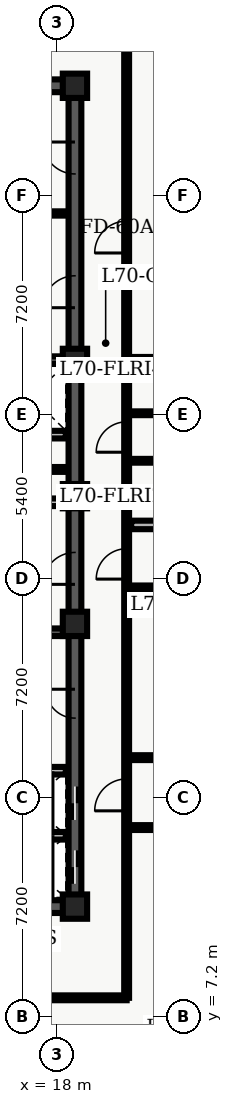
"""IFC4 building model, lengths in metres.
Left out: names, types, materials, properties, quantities, classifications, styles, units other than length and angle.
Written with IfcOpenShell. Run it as: python <this file> out.ifc"""

import sys

from ifc_helpers import new_model, entity, si_unit, converted_unit, direction, frame, origin_with_axes, origin_2d_with_axis, place, context, subcontext, project, spatial, polyline, rectangle, outline, extrude, element, fill, save


model = new_model("IFC4")
c1 = context("Model", 3, precision=1e-05, world=origin_with_axes(), true_north=direction((0.0, 1.0)))
c2 = subcontext(c1, "Body", "Model", "MODEL_VIEW")
j1 = project(units=[si_unit("LENGTHUNIT", "METRE"), converted_unit("PLANEANGLEUNIT", "DEGREE", entity("IfcPlaneAngleMeasure", 0.017), si_unit("PLANEANGLEUNIT", "RADIAN"), dimensions=[0, 0, 0, 0, 0, 0, 0])], contexts=[c1])
p1 = place(None, origin_with_axes())
s1 = spatial("IfcSite", under=j1, at=p1, CompositionType="ELEMENT")
p2 = place(p1, origin_with_axes())
s2 = spatial("IfcBuilding", under=s1, at=p2, CompositionType="ELEMENT")
p3 = place(p2, frame((0.0, 0.0, 284.1), z_axis=(0.0, 0.0, 1.0), x_axis=(1.0, 0.0, 0.0)))
s3 = spatial("IfcBuildingStorey", under=s2, at=p3, CompositionType="ELEMENT", Elevation=284.1)
p4 = place(p3, frame((11.4, 10.8, 0.0), z_axis=(0.0, 0.0, 1.0), x_axis=(1.0, 0.0, 0.0)))
e1 = element("IfcWall", 1, at=p4, inside=s3, PredefinedType="SHEAR", context=c2, shape_type="SweptSolid", body=[
    extrude(outline(polyline([(0.0, -0.21), (7.2, -0.21), (7.2, 0.21), (0.0, 0.21), (0.0, -0.21)])), origin_with_axes(), (0.0, 0.0, 1.0), 3.6),
])
p5 = place(p4, frame((2.625, 0.0, 0.0), z_axis=(0.0, 0.0, 1.0), x_axis=(1.0, 0.0, 0.0)))
e2 = element("IfcOpeningElement", 2, at=p5, cuts=e1, PredefinedType="OPENING", context=c2, shape_type="SweptSolid", body=[
    extrude(rectangle(XDim=1.05, YDim=0.44, at=origin_2d_with_axis()), origin_with_axes(), (0.0, 0.0, 1.0), 2.15),
])
p6 = place(p3, frame((11.4, 37.8, 0.0), z_axis=(0.0, 0.0, 1.0), x_axis=(1.0, 0.0, 0.0)))
e3 = element("IfcWall", 3, at=p6, inside=s3, PredefinedType="SHEAR", context=c2, shape_type="SweptSolid", body=[
    extrude(outline(polyline([(0.0, -0.21), (7.2, -0.21), (7.2, 0.21), (0.0, 0.21), (0.0, -0.21)])), origin_with_axes(), (0.0, 0.0, 1.0), 3.6),
])
p7 = place(p6, frame((2.625, 0.0, 0.0), z_axis=(0.0, 0.0, 1.0), x_axis=(1.0, 0.0, 0.0)))
e4 = element("IfcOpeningElement", 4, at=p7, cuts=e3, PredefinedType="OPENING", context=c2, shape_type="SweptSolid", body=[
    extrude(rectangle(XDim=1.05, YDim=0.44, at=origin_2d_with_axis()), origin_with_axes(), (0.0, 0.0, 1.0), 2.15),
])
p8 = place(p3, frame((18.6, 10.8, 0.0), z_axis=(0.0, 0.0, 1.0), x_axis=(0.0, 1.0, 0.0)))
e5 = element("IfcWall", 5, at=p8, inside=s3, PredefinedType="SHEAR", context=c2, shape_type="SweptSolid", body=[
    extrude(outline(polyline([(0.0, -0.21), (13.5, -0.21), (13.5, 0.21), (0.0, 0.21), (0.0, -0.21)])), origin_with_axes(), (0.0, 0.0, 1.0), 3.6),
])
p9 = place(p8, frame((1.3, 0.0, 0.0), z_axis=(0.0, 0.0, 1.0), x_axis=(1.0, 0.0, 0.0)))
e6 = element("IfcOpeningElement", 6, at=p9, cuts=e5, PredefinedType="OPENING", context=c2, shape_type="SweptSolid", body=[
    extrude(rectangle(XDim=1.1, YDim=0.44, at=origin_2d_with_axis()), origin_with_axes(), (0.0, 0.0, 1.0), 2.15),
])
p10 = place(p8, frame((3.4, 0.0, 0.0), z_axis=(0.0, 0.0, 1.0), x_axis=(1.0, 0.0, 0.0)))
e7 = element("IfcOpeningElement", 7, at=p10, cuts=e5, PredefinedType="OPENING", context=c2, shape_type="SweptSolid", body=[
    extrude(rectangle(XDim=1.1, YDim=0.44, at=origin_2d_with_axis()), origin_with_axes(), (0.0, 0.0, 1.0), 2.15),
])
p11 = place(p8, frame((11.125, 0.0, 0.0), z_axis=(0.0, 0.0, 1.0), x_axis=(1.0, 0.0, 0.0)))
e8 = element("IfcOpeningElement", 8, at=p11, cuts=e5, PredefinedType="OPENING", context=c2, shape_type="SweptSolid", body=[
    extrude(rectangle(XDim=1.05, YDim=0.44, at=origin_2d_with_axis()), origin_with_axes(), (0.0, 0.0, 1.0), 2.15),
])
p12 = place(p8, frame((6.675, 0.0, 0.0), z_axis=(0.0, 0.0, 1.0), x_axis=(1.0, 0.0, 0.0)))
e9 = element("IfcOpeningElement", 9, at=p12, cuts=e5, PredefinedType="OPENING", context=c2, shape_type="SweptSolid", body=[
    extrude(rectangle(XDim=0.95, YDim=0.44, at=origin_2d_with_axis()), origin_with_axes(), (0.0, 0.0, 1.0), 2.15),
])
p13 = place(p3, frame((18.6, 24.3, 0.0), z_axis=(0.0, 0.0, 1.0), x_axis=(0.0, 1.0, 0.0)))
e10 = element("IfcWall", 10, at=p13, inside=s3, PredefinedType="SHEAR", context=c2, shape_type="SweptSolid", body=[
    extrude(outline(polyline([(0.0, -0.21), (13.5, -0.21), (13.5, 0.21), (0.0, 0.21), (0.0, -0.21)])), origin_with_axes(), (0.0, 0.0, 1.0), 3.6),
])
p14 = place(p13, frame((6.725, 0.0, 0.0), z_axis=(0.0, 0.0, 1.0), x_axis=(1.0, 0.0, 0.0)))
e11 = element("IfcOpeningElement", 11, at=p14, cuts=e10, PredefinedType="OPENING", context=c2, shape_type="SweptSolid", body=[
    extrude(rectangle(XDim=1.05, YDim=0.44, at=origin_2d_with_axis()), origin_with_axes(), (0.0, 0.0, 1.0), 2.15),
])
p15 = place(p13, frame((11.125, 0.0, 0.0), z_axis=(0.0, 0.0, 1.0), x_axis=(1.0, 0.0, 0.0)))
e12 = element("IfcOpeningElement", 12, at=p15, cuts=e10, PredefinedType="OPENING", context=c2, shape_type="SweptSolid", body=[
    extrude(rectangle(XDim=1.05, YDim=0.44, at=origin_2d_with_axis()), origin_with_axes(), (0.0, 0.0, 1.0), 2.15),
])
for number, where, z_axis, x_axis in (
    (13, (11.61, 19.825, 0.0), (0.0, 0.0, 1.0), (1.0, 0.0, 0.0)),
    (14, (11.61, 28.775, 0.0), (0.0, 0.0, 1.0), (1.0, 0.0, 0.0)),
):
    element("IfcWall", number, at=place(p3, frame(where, z_axis=z_axis, x_axis=x_axis)), inside=s3, PredefinedType="SHEAR", context=c2, shape_type="SweptSolid", body=[
        extrude(outline(polyline([(0.0, -0.125), (6.78, -0.125), (6.78, 0.125), (0.0, 0.125), (0.0, -0.125)])), origin_with_axes(), (0.0, 0.0, 1.0), 3.6),
    ])
p16 = place(p3, frame((11.7, 24.1, 0.0), z_axis=(0.0, 0.0, 1.0), x_axis=(1.0, 0.0, 0.0)))
e15 = element("IfcWall", 15, at=p16, inside=s3, PredefinedType="SOLIDWALL", context=c2, shape_type="SweptSolid", body=[
    extrude(outline(polyline([(0.0, -0.125), (6.6, -0.125), (6.6, 0.125), (0.0, 0.125), (0.0, -0.125)])), origin_with_axes(), (0.0, 0.0, 1.0), 2.64),
])
p17 = place(p16, frame((3.75, 0.0, 0.0), z_axis=(0.0, 0.0, 1.0), x_axis=(1.0, 0.0, 0.0)))
e16 = element("IfcOpeningElement", 16, at=p17, cuts=e15, PredefinedType="OPENING", context=c2, shape_type="SweptSolid", body=[
    extrude(rectangle(XDim=0.9, YDim=0.27, at=origin_2d_with_axis()), origin_with_axes(), (0.0, 0.0, 1.0), 2.15),
])
p18 = place(p3, frame((11.7, 26.325, 0.0), z_axis=(0.0, 0.0, 1.0), x_axis=(1.0, 0.0, 0.0)))
e17 = element("IfcWall", 17, at=p18, inside=s3, PredefinedType="SOLIDWALL", context=c2, shape_type="SweptSolid", body=[
    extrude(outline(polyline([(0.0, -0.125), (6.6, -0.125), (6.6, 0.125), (0.0, 0.125), (0.0, -0.125)])), origin_with_axes(), (0.0, 0.0, 1.0), 2.64),
])
p19 = place(p18, frame((3.5, 0.0, 0.0), z_axis=(0.0, 0.0, 1.0), x_axis=(1.0, 0.0, 0.0)))
e18 = element("IfcOpeningElement", 18, at=p19, cuts=e17, PredefinedType="OPENING", context=c2, shape_type="SweptSolid", body=[
    extrude(rectangle(XDim=0.9, YDim=0.27, at=origin_2d_with_axis()), origin_with_axes(), (0.0, 0.0, 1.0), 2.15),
])
for number, where, z_axis, x_axis in (
    (19, (18.6, 10.8, 0.0), (0.0, 0.0, 1.0), (1.0, 0.0, 0.0)),
    (20, (18.6, 20.1, 0.0), (0.0, 0.0, 1.0), (1.0, 0.0, 0.0)),
    (21, (18.6, 24.3, 0.0), (0.0, 0.0, 1.0), (1.0, 0.0, 0.0)),
    (22, (18.6, 28.75, 0.0), (0.0, 0.0, 1.0), (1.0, 0.0, 0.0)),
    (23, (18.6, 37.8, 0.0), (0.0, 0.0, 1.0), (1.0, 0.0, 0.0)),
):
    element("IfcColumn", number, at=place(p3, frame(where, z_axis=z_axis, x_axis=x_axis)), inside=s3, PredefinedType="COLUMN", context=c2, shape_type="SweptSolid", body=[
        extrude(rectangle(XDim=0.8, YDim=0.8, at=origin_2d_with_axis()), origin_with_axes(), (0.0, 0.0, 1.0), 3.9),
    ])
p20 = place(p3, frame((14.62, 25.18, 0.0), z_axis=(0.0, 0.0, 1.0), x_axis=(1.0, 0.0, 0.0)))
e24 = element("IfcWall", 24, at=p20, inside=s3, PredefinedType="PARTITIONING", context=c2, shape_type="SweptSolid", body=[
    extrude(outline(polyline([(0.0, -0.08), (3.68, -0.08), (3.68, 0.08), (0.0, 0.08), (0.0, -0.08)])), origin_with_axes(), (0.0, 0.0, 1.0), 2.64),
])
p21 = place(p20, frame((1.95, 0.0, 0.0), z_axis=(0.0, 0.0, 1.0), x_axis=(1.0, 0.0, 0.0)))
e25 = element("IfcOpeningElement", 25, at=p21, cuts=e24, PredefinedType="OPENING", context=c2, shape_type="SweptSolid", body=[
    extrude(rectangle(XDim=0.9, YDim=0.18, at=origin_2d_with_axis()), origin_with_axes(), (0.0, 0.0, 1.0), 2.15),
])
for number, where, z_axis, x_axis in (
    (26, (15.84, 13.13, 0.0), (0.0, 0.0, 1.0), (1.0, 0.0, 0.0)),
    (27, (15.84, 15.27, 0.0), (0.0, 0.0, 1.0), (1.0, 0.0, 0.0)),
):
    element("IfcWall", number, at=place(p3, frame(where, z_axis=z_axis, x_axis=x_axis)), inside=s3, PredefinedType="SOLIDWALL", context=c2, shape_type="SweptSolid", body=[
        extrude(outline(polyline([(0.0, -0.125), (2.46, -0.125), (2.46, 0.125), (0.0, 0.125), (0.0, -0.125)])), origin_with_axes(), (0.0, 0.0, 1.0), 2.64),
    ])
p22 = place(p3, frame((15.84, 33.6, 0.0), z_axis=(0.0, 0.0, 1.0), x_axis=(1.0, 0.0, 0.0)))
e28 = element("IfcWall", 28, at=p22, inside=s3, PredefinedType="PARTITIONING", context=c2, shape_type="SweptSolid", body=[
    extrude(outline(polyline([(0.0, -0.07), (2.46, -0.07), (2.46, 0.07), (0.0, 0.07), (0.0, -0.07)])), origin_with_axes(), (0.0, 0.0, 1.0), 2.64),
])
p23 = place(p3, frame((8.135, 7.8, 0.0), z_axis=(0.0, 0.0, 1.0), x_axis=(1.0, 0.0, 0.0)))
e29 = element("IfcWall", 29, at=p23, inside=s3, PredefinedType="PARTITIONING", context=c2, shape_type="SweptSolid", body=[
    extrude(outline(polyline([(0.0, -0.08), (12.165, -0.08), (12.165, 0.08), (0.0, 0.08), (0.0, -0.08)])), origin_with_axes(), (0.0, 0.0, 1.0), 2.64),
])
p24 = place(p23, frame((6.065, 0.0, 0.0), z_axis=(0.0, 0.0, 1.0), x_axis=(1.0, 0.0, 0.0)))
e30 = element("IfcOpeningElement", 30, at=p24, cuts=e29, PredefinedType="OPENING", context=c2, shape_type="SweptSolid", body=[
    extrude(rectangle(XDim=1.0, YDim=0.18, at=origin_2d_with_axis()), origin_with_axes(), (0.0, 0.0, 1.0), 2.15),
])
p25 = place(p3, frame((20.3, 7.8, 0.0), z_axis=(0.0, 0.0, 1.0), x_axis=(0.0, 1.0, 0.0)))
e31 = element("IfcWall", 31, at=p25, inside=s3, PredefinedType="PARTITIONING", context=c2, shape_type="SweptSolid", body=[
    extrude(outline(polyline([(0.0, -0.08), (32.7, -0.08), (32.7, 0.08), (0.0, 0.08), (0.0, -0.08)])), origin_with_axes(), (0.0, 0.0, 1.0), 2.64),
])
p26 = place(p25, frame((25.025, 0.0, 0.0), z_axis=(0.0, 0.0, 1.0), x_axis=(1.0, 0.0, 0.0)))
e32 = element("IfcOpeningElement", 32, at=p26, cuts=e31, PredefinedType="OPENING", context=c2, shape_type="SweptSolid", body=[
    extrude(rectangle(XDim=1.05, YDim=0.18, at=origin_2d_with_axis()), origin_with_axes(), (0.0, 0.0, 1.0), 2.15),
])
p27 = place(p25, frame((14.273, 0.0, 0.0), z_axis=(0.0, 0.0, 1.0), x_axis=(1.0, 0.0, 0.0)))
e33 = element("IfcOpeningElement", 33, at=p27, cuts=e31, PredefinedType="OPENING", context=c2, shape_type="SweptSolid", body=[
    extrude(rectangle(XDim=1.0, YDim=0.18, at=origin_2d_with_axis()), origin_with_axes(), (0.0, 0.0, 1.0), 2.15),
])
p28 = place(p25, frame((18.447, 0.0, 0.0), z_axis=(0.0, 0.0, 1.0), x_axis=(1.0, 0.0, 0.0)))
e34 = element("IfcOpeningElement", 34, at=p28, cuts=e31, PredefinedType="OPENING", context=c2, shape_type="SweptSolid", body=[
    extrude(rectangle(XDim=1.0, YDim=0.18, at=origin_2d_with_axis()), origin_with_axes(), (0.0, 0.0, 1.0), 2.15),
])
p29 = place(p25, frame((6.675, 0.0, 0.0), z_axis=(0.0, 0.0, 1.0), x_axis=(1.0, 0.0, 0.0)))
e35 = element("IfcOpeningElement", 35, at=p29, cuts=e31, PredefinedType="OPENING", context=c2, shape_type="SweptSolid", body=[
    extrude(rectangle(XDim=1.05, YDim=0.18, at=origin_2d_with_axis()), origin_with_axes(), (0.0, 0.0, 1.0), 2.15),
])
p30 = place(p3, frame((20.3, 28.8, 0.0), z_axis=(0.0, 0.0, 1.0), x_axis=(1.0, 0.0, 0.0)))
e36 = element("IfcWall", 36, at=p30, inside=s3, PredefinedType="PARTITIONING", context=c2, shape_type="SweptSolid", body=[
    extrude(outline(polyline([(0.0, -0.08), (3.32, -0.08), (3.32, 0.08), (0.0, 0.08), (0.0, -0.08)])), origin_with_axes(), (0.0, 0.0, 1.0), 2.64),
])
p31 = place(p3, frame((20.45, 23.355, 0.0), z_axis=(0.0, 0.0, 1.0), x_axis=(1.0, 0.0, 0.0)))
e37 = element("IfcWall", 37, at=p31, inside=s3, PredefinedType="PARTITIONING", context=c2, shape_type="SweptSolid", body=[
    extrude(outline(polyline([(0.0, -0.14), (14.085, -0.14), (14.085, 0.14), (0.0, 0.14), (0.0, -0.14)])), origin_with_axes(), (0.0, 0.0, 1.0), 2.64),
])
p32 = place(p31, frame((2.975, 0.0, 0.0), z_axis=(0.0, 0.0, 1.0), x_axis=(1.0, 0.0, 0.0)))
e38 = element("IfcOpeningElement", 38, at=p32, cuts=e37, PredefinedType="OPENING", context=c2, shape_type="SweptSolid", body=[
    extrude(rectangle(XDim=0.95, YDim=0.3, at=origin_2d_with_axis()), origin_with_axes(), (0.0, 0.0, 1.0), 2.15),
])
p33 = place(p3, frame((20.45, 25.465, 0.0), z_axis=(0.0, 0.0, 1.0), x_axis=(1.0, 0.0, 0.0)))
e39 = element("IfcWall", 39, at=p33, inside=s3, PredefinedType="PARTITIONING", context=c2, shape_type="SweptSolid", body=[
    extrude(outline(polyline([(0.0, -0.062), (14.085, -0.062), (14.085, 0.062), (0.0, 0.062), (0.0, -0.062)])), origin_with_axes(), (0.0, 0.0, 1.0), 2.64),
])
p34 = place(p3, frame((20.45, 27.028, 0.0), z_axis=(0.0, 0.0, 1.0), x_axis=(1.0, 0.0, 0.0)))
e40 = element("IfcWall", 40, at=p34, inside=s3, PredefinedType="PARTITIONING", context=c2, shape_type="SweptSolid", body=[
    extrude(outline(polyline([(0.0, -0.062), (14.085, -0.062), (14.085, 0.062), (0.0, 0.062), (0.0, -0.062)])), origin_with_axes(), (0.0, 0.0, 1.0), 2.64),
])
p35 = place(p34, frame((2.975, 0.0, 0.0), z_axis=(0.0, 0.0, 1.0), x_axis=(1.0, 0.0, 0.0)))
e41 = element("IfcOpeningElement", 41, at=p35, cuts=e40, PredefinedType="OPENING", context=c2, shape_type="SweptSolid", body=[
    extrude(rectangle(XDim=0.95, YDim=0.145, at=origin_2d_with_axis()), origin_with_axes(), (0.0, 0.0, 1.0), 2.15),
])
p36 = place(p3, frame((20.3, 13.4, 0.0), z_axis=(0.0, 0.0, 1.0), x_axis=(1.0, 0.0, 0.0)))
e42 = element("IfcWall", 42, at=p36, inside=s3, PredefinedType="PARTITIONING", context=c2, shape_type="SweptSolid", body=[
    extrude(outline(polyline([(0.0, -0.08), (15.45, -0.08), (15.45, 0.08), (0.0, 0.08), (0.0, -0.08)])), origin_with_axes(), (0.0, 0.0, 1.0), 2.64),
])
p37 = place(p36, frame((2.304, 0.0, 0.0), z_axis=(0.0, 0.0, 1.0), x_axis=(1.0, 0.0, 0.0)))
e43 = element("IfcOpeningElement", 43, at=p37, cuts=e42, PredefinedType="OPENING", context=c2, shape_type="SweptSolid", body=[
    extrude(rectangle(XDim=1.0, YDim=0.18, at=origin_2d_with_axis()), origin_with_axes(), (0.0, 0.0, 1.0), 2.15),
])
p38 = place(p36, frame((6.866, 0.0, 0.0), z_axis=(0.0, 0.0, 1.0), x_axis=(1.0, 0.0, 0.0)))
e44 = element("IfcOpeningElement", 44, at=p38, cuts=e42, PredefinedType="OPENING", context=c2, shape_type="SweptSolid", body=[
    extrude(rectangle(XDim=1.0, YDim=0.18, at=origin_2d_with_axis()), origin_with_axes(), (0.0, 0.0, 1.0), 2.15),
])
p39 = place(p36, frame((12.337, 0.0, 0.0), z_axis=(0.0, 0.0, 1.0), x_axis=(1.0, 0.0, 0.0)))
e45 = element("IfcOpeningElement", 45, at=p39, cuts=e42, PredefinedType="OPENING", context=c2, shape_type="SweptSolid", body=[
    extrude(rectangle(XDim=1.2, YDim=0.18, at=origin_2d_with_axis()), origin_with_axes(), (0.0, 0.0, 1.0), 2.2),
])
p40 = place(p3, frame((20.3, 15.7, 0.0), z_axis=(0.0, 0.0, 1.0), x_axis=(1.0, 0.0, 0.0)))
e46 = element("IfcWall", 46, at=p40, inside=s3, PredefinedType="PARTITIONING", context=c2, shape_type="SweptSolid", body=[
    extrude(outline(polyline([(0.0, -0.08), (15.45, -0.08), (15.45, 0.08), (0.0, 0.08), (0.0, -0.08)])), origin_with_axes(), (0.0, 0.0, 1.0), 2.64),
])
p41 = place(p40, frame((7.775, 0.0, 0.0), z_axis=(0.0, 0.0, 1.0), x_axis=(1.0, 0.0, 0.0)))
e47 = element("IfcOpeningElement", 47, at=p41, cuts=e46, PredefinedType="OPENING", context=c2, shape_type="SweptSolid", body=[
    extrude(rectangle(XDim=1.0, YDim=0.18, at=origin_2d_with_axis()), origin_with_axes(), (0.0, 0.0, 1.0), 2.15),
])
p42 = place(p3, frame((20.3, 21.3, 0.0), z_axis=(0.0, 0.0, 1.0), x_axis=(1.0, 0.0, 0.0)))
e48 = element("IfcWall", 48, at=p42, inside=s3, PredefinedType="PARTITIONING", context=c2, shape_type="SweptSolid", body=[
    extrude(outline(polyline([(0.0, -0.062), (11.765, -0.062), (11.765, 0.062), (0.0, 0.062), (0.0, -0.062)])), origin_with_axes(), (0.0, 0.0, 1.0), 2.64),
])
p43 = place(p8, frame((1.3, 0.0, 0.0), z_axis=(0.0, 0.0, 1.0), x_axis=(1.0, 0.0, 0.0)))
e49 = element("IfcDoor", 49, at=p43, inside=s3, OperationType="SLIDING_TO_LEFT", PredefinedType="DOOR", context=c2, shape_type="SweptSolid", body=[
    extrude(rectangle(XDim=1.1, YDim=0.09, at=origin_2d_with_axis()), origin_with_axes(), (0.0, 0.0, 1.0), 2.15),
])
fill(e6, e49)
p44 = place(p8, frame((3.4, 0.0, 0.0), z_axis=(0.0, 0.0, 1.0), x_axis=(1.0, 0.0, 0.0)))
e50 = element("IfcDoor", 50, at=p44, inside=s3, OperationType="SLIDING_TO_RIGHT", PredefinedType="DOOR", context=c2, shape_type="SweptSolid", body=[
    extrude(rectangle(XDim=1.1, YDim=0.09, at=origin_2d_with_axis()), origin_with_axes(), (0.0, 0.0, 1.0), 2.15),
])
fill(e7, e50)
p45 = place(p8, frame((11.125, 0.0, 0.0), z_axis=(0.0, 0.0, 1.0), x_axis=(1.0, 0.0, 0.0)))
e51 = element("IfcDoor", 51, at=p45, inside=s3, OperationType="SINGLE_SWING_LEFT", PredefinedType="DOOR", context=c2, shape_type="SweptSolid", body=[
    extrude(rectangle(XDim=1.05, YDim=0.09, at=origin_2d_with_axis()), origin_with_axes(), (0.0, 0.0, 1.0), 2.15),
])
fill(e8, e51)
p46 = place(p8, frame((6.675, 0.0, 0.0), z_axis=(0.0, 0.0, 1.0), x_axis=(1.0, 0.0, 0.0)))
e52 = element("IfcDoor", 52, at=p46, inside=s3, OperationType="SINGLE_SWING_RIGHT", PredefinedType="DOOR", context=c2, shape_type="SweptSolid", body=[
    extrude(rectangle(XDim=0.95, YDim=0.09, at=origin_2d_with_axis()), origin_with_axes(), (0.0, 0.0, 1.0), 2.15),
])
fill(e9, e52)
p47 = place(p13, frame((6.725, 0.0, 0.0), z_axis=(0.0, 0.0, 1.0), x_axis=(1.0, 0.0, 0.0)))
e53 = element("IfcDoor", 53, at=p47, inside=s3, OperationType="SINGLE_SWING_LEFT", PredefinedType="DOOR", context=c2, shape_type="SweptSolid", body=[
    extrude(rectangle(XDim=1.05, YDim=0.09, at=origin_2d_with_axis()), origin_with_axes(), (0.0, 0.0, 1.0), 2.15),
])
fill(e11, e53)
p48 = place(p13, frame((11.125, 0.0, 0.0), z_axis=(0.0, 0.0, 1.0), x_axis=(1.0, 0.0, 0.0)))
e54 = element("IfcDoor", 54, at=p48, inside=s3, OperationType="SINGLE_SWING_RIGHT", PredefinedType="DOOR", context=c2, shape_type="SweptSolid", body=[
    extrude(rectangle(XDim=1.05, YDim=0.09, at=origin_2d_with_axis()), origin_with_axes(), (0.0, 0.0, 1.0), 2.15),
])
fill(e12, e54)
p49 = place(p25, frame((25.025, 0.0, 0.0), z_axis=(0.0, 0.0, 1.0), x_axis=(1.0, 0.0, 0.0)))
e55 = element("IfcDoor", 55, at=p49, inside=s3, OperationType="SINGLE_SWING_LEFT", PredefinedType="DOOR", context=c2, shape_type="SweptSolid", body=[
    extrude(rectangle(XDim=1.05, YDim=0.09, at=origin_2d_with_axis()), origin_with_axes(), (0.0, 0.0, 1.0), 2.15),
])
fill(e32, e55)
p50 = place(p25, frame((14.273, 0.0, 0.0), z_axis=(0.0, 0.0, 1.0), x_axis=(1.0, 0.0, 0.0)))
e56 = element("IfcDoor", 56, at=p50, inside=s3, OperationType="SINGLE_SWING_LEFT", PredefinedType="DOOR", context=c2, shape_type="SweptSolid", body=[
    extrude(rectangle(XDim=1.0, YDim=0.09, at=origin_2d_with_axis()), origin_with_axes(), (0.0, 0.0, 1.0), 2.15),
])
fill(e33, e56)
p51 = place(p25, frame((18.447, 0.0, 0.0), z_axis=(0.0, 0.0, 1.0), x_axis=(1.0, 0.0, 0.0)))
e57 = element("IfcDoor", 57, at=p51, inside=s3, OperationType="SINGLE_SWING_LEFT", PredefinedType="DOOR", context=c2, shape_type="SweptSolid", body=[
    extrude(rectangle(XDim=1.0, YDim=0.09, at=origin_2d_with_axis()), origin_with_axes(), (0.0, 0.0, 1.0), 2.15),
])
fill(e34, e57)
p52 = place(p25, frame((6.675, 0.0, 0.0), z_axis=(0.0, 0.0, 1.0), x_axis=(1.0, 0.0, 0.0)))
e58 = element("IfcDoor", 58, at=p52, inside=s3, OperationType="SINGLE_SWING_LEFT", PredefinedType="DOOR", context=c2, shape_type="SweptSolid", body=[
    extrude(rectangle(XDim=1.05, YDim=0.09, at=origin_2d_with_axis()), origin_with_axes(), (0.0, 0.0, 1.0), 2.15),
])
fill(e35, e58)
save(model, sys.argv[1])
